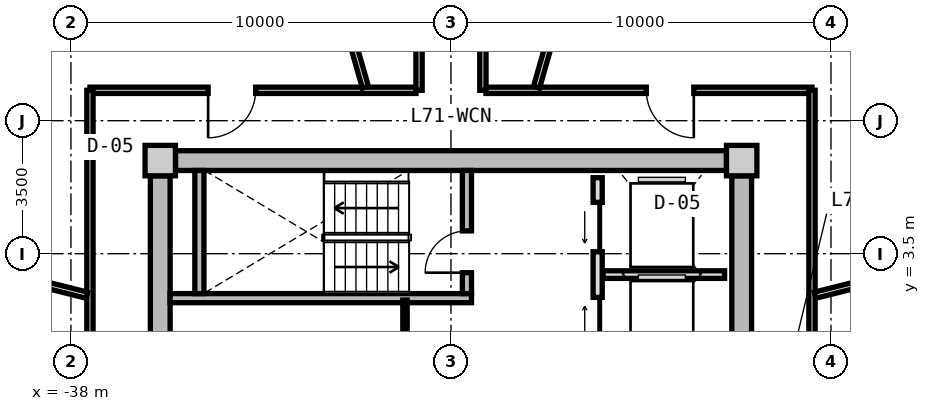
"""IFC4 building model, lengths in metres.
Left out: names, types, materials, properties, quantities, classifications, styles, units other than length and angle.
Written with IfcOpenShell. Run it as: python <this file> out.ifc"""

import sys

from ifc_helpers import new_model, si_unit, direction, frame, frame_2d, origin, origin_2d, place, context, subcontext, project, spatial, rectangle, extrude, source, transform, mapped, element, fill, save


model = new_model("IFC4")
c1 = context("Model", 3, precision=1e-05, world=origin(), true_north=direction((0.0, 1.0)))
c2 = subcontext(c1, "Body", "Model", "MODEL_VIEW")
j1 = project(units=[si_unit("LENGTHUNIT", "METRE"), si_unit("PLANEANGLEUNIT", "RADIAN")], contexts=[c1])
p1 = place(None, origin())
s1 = spatial("IfcSite", under=j1, at=p1, CompositionType="ELEMENT")
p2 = place(p1, origin())
s2 = spatial("IfcBuilding", under=s1, at=p2, CompositionType="ELEMENT")
p3 = place(p2, frame((0.0, 0.0, 229.15)))
s3 = spatial("IfcBuildingStorey", under=s2, at=p3, CompositionType="ELEMENT", Elevation=229.15)
m1 = source(origin(), c2, "Body", "SweptSolid", [
    extrude(rectangle(XDim=0.8, YDim=0.8, at=origin_2d()), origin(), (0.0, 0.0, 1.0), 3.05),
])
for number, where, z_axis, x_axis in (
    (1, (-20.35, 5.95, 0.0), (0.0, 0.0, 1.0), (1.0, 0.0, 0.0)),
    (2, (-35.65, 5.95, 0.0), (0.0, 0.0, 1.0), (1.0, 0.0, 0.0)),
):
    element("IfcColumn", number, at=place(p3, frame(where, z_axis=z_axis, x_axis=x_axis)), inside=s3, PredefinedType="COLUMN", context=c2, shape_type="MappedRepresentation", body=[
        mapped(m1, transform((0.0, 0.0, 0.0), x_axis=(1.0, 0.0, 0.0), y_axis=(0.0, 1.0, 0.0), z_axis=(0.0, 0.0, 1.0), scale=1.0)),
    ])
m2 = source(origin(), c2, "Body", "SweptSolid", [
    extrude(rectangle(XDim=14.5, YDim=0.52, at=frame_2d((7.25, 0.0))), origin(), (0.0, 0.0, 1.0), 2.81),
])
p4 = place(p3, frame((-35.25, 5.95, 0.0), z_axis=(0.0, 0.0, 1.0), x_axis=(1.0, 0.0, 0.0)))
e3 = element("IfcWall", 3, at=p4, inside=s3, PredefinedType="SHEAR", context=c2, shape_type="MappedRepresentation", body=[
    mapped(m2, transform((0.0, 0.0, 0.0), x_axis=(1.0, 0.0, 0.0), y_axis=(0.0, 1.0, 0.0), z_axis=(0.0, 0.0, 1.0), scale=1.0)),
])
m3 = source(origin(), c2, "Body", "SweptSolid", [
    extrude(rectangle(XDim=11.1, YDim=0.52, at=frame_2d((5.55, 0.0))), origin(), (0.0, 0.0, 1.0), 2.81),
])
p5 = place(p3, frame((-35.65, -5.55, 0.0), z_axis=(0.0, 0.0, 1.0), x_axis=(0.0, 1.0, 0.0)))
e4 = element("IfcWall", 4, at=p5, inside=s3, PredefinedType="SHEAR", context=c2, shape_type="MappedRepresentation", body=[
    mapped(m3, transform((0.0, 0.0, 0.0), x_axis=(1.0, 0.0, 0.0), y_axis=(0.0, 1.0, 0.0), z_axis=(0.0, 0.0, 1.0), scale=1.0)),
])
p6 = place(p5, frame((3.8, 0.0, 0.0)))
e5 = element("IfcOpeningElement", 5, at=p6, cuts=e4, PredefinedType="OPENING", context=c2, shape_type="SweptSolid", body=[
    extrude(rectangle(XDim=1.2, YDim=2.15, at=frame_2d((0.6, 1.075))), frame((0.0, 0.27, 0.0), z_axis=(0.0, -1.0, 0.0), x_axis=(1.0, 0.0, 0.0)), (0.0, 0.0, 1.0), 0.54),
])
p7 = place(p3, frame((-20.35, 5.55, 0.0), z_axis=(0.0, 0.0, 1.0), x_axis=(0.0, -1.0, 0.0)))
e6 = element("IfcWall", 6, at=p7, inside=s3, PredefinedType="SHEAR", context=c2, shape_type="MappedRepresentation", body=[
    mapped(m3, transform((0.0, 0.0, 0.0), x_axis=(1.0, 0.0, 0.0), y_axis=(0.0, 1.0, 0.0), z_axis=(0.0, 0.0, 1.0), scale=1.0)),
])
p8 = place(p7, frame((5.65, 0.0, 0.0)))
e7 = element("IfcOpeningElement", 7, at=p8, cuts=e6, PredefinedType="OPENING", context=c2, shape_type="SweptSolid", body=[
    extrude(rectangle(XDim=1.2, YDim=2.15, at=frame_2d((0.6, 1.075))), frame((0.0, 0.27, 0.0), z_axis=(0.0, -1.0, 0.0), x_axis=(1.0, 0.0, 0.0)), (0.0, 0.0, 1.0), 0.54),
])
p9 = place(p7, frame((9.3, 0.0, 0.0)))
e8 = element("IfcOpeningElement", 8, at=p9, cuts=e6, PredefinedType="OPENING", context=c2, shape_type="SweptSolid", body=[
    extrude(rectangle(XDim=1.0, YDim=2.1, at=frame_2d((0.5, 1.05))), frame((0.0, 0.27, 0.0), z_axis=(0.0, -1.0, 0.0), x_axis=(1.0, 0.0, 0.0)), (0.0, 0.0, 1.0), 0.54),
])
m4 = source(origin(), c2, "Body", "SweptSolid", [
    extrude(rectangle(XDim=7.93, YDim=0.24, at=frame_2d((3.965, 0.0))), origin(), (0.0, 0.0, 1.0), 2.81),
])
p10 = place(p3, frame((-35.39, 2.33, 0.0), z_axis=(0.0, 0.0, 1.0), x_axis=(1.0, 0.0, 0.0)))
e9 = element("IfcWall", 9, at=p10, inside=s3, PredefinedType="PARTITIONING", context=c2, shape_type="MappedRepresentation", body=[
    mapped(m4, transform((0.0, 0.0, 0.0), x_axis=(1.0, 0.0, 0.0), y_axis=(0.0, 1.0, 0.0), z_axis=(0.0, 0.0, 1.0), scale=1.0)),
])
m5 = source(origin(), c2, "Body", "SweptSolid", [
    extrude(rectangle(XDim=3.24, YDim=0.24, at=frame_2d((1.62, 0.0))), origin(), (0.0, 0.0, 1.0), 2.81),
])
p11 = place(p3, frame((-34.62, 2.45, 0.0), z_axis=(0.0, 0.0, 1.0), x_axis=(0.0, 1.0, 0.0)))
e10 = element("IfcWall", 10, at=p11, inside=s3, PredefinedType="PARTITIONING", context=c2, shape_type="MappedRepresentation", body=[
    mapped(m5, transform((0.0, 0.0, 0.0), x_axis=(1.0, 0.0, 0.0), y_axis=(0.0, 1.0, 0.0), z_axis=(0.0, 0.0, 1.0), scale=1.0)),
])
p12 = place(p3, frame((-27.58, 2.45, 0.0), z_axis=(0.0, 0.0, 1.0), x_axis=(0.0, 1.0, 0.0)))
e11 = element("IfcWall", 11, at=p12, inside=s3, PredefinedType="PARTITIONING", context=c2, shape_type="MappedRepresentation", body=[
    mapped(m5, transform((0.0, 0.0, 0.0), x_axis=(1.0, 0.0, 0.0), y_axis=(0.0, 1.0, 0.0), z_axis=(0.0, 0.0, 1.0), scale=1.0)),
])
p13 = place(p12, frame((0.55, 0.0, 0.0)))
e12 = element("IfcOpeningElement", 12, at=p13, cuts=e11, PredefinedType="OPENING", context=c2, shape_type="SweptSolid", body=[
    extrude(rectangle(XDim=1.1, YDim=2.15, at=frame_2d((0.55, 1.075))), frame((0.0, 0.13, 0.0), z_axis=(0.0, -1.0, 0.0), x_axis=(1.0, 0.0, 0.0)), (0.0, 0.0, 1.0), 0.26),
])
m6 = source(origin(), c2, "Body", "SweptSolid", [
    extrude(rectangle(XDim=5.0, YDim=0.24, at=frame_2d((2.5, 0.0))), origin(), (0.0, 0.0, 1.0), 2.795),
])
p14 = place(p3, frame((-24.14, 0.5, 0.0), z_axis=(0.0, 0.0, 1.0), x_axis=(0.0, 1.0, 0.0)))
e13 = element("IfcWall", 13, at=p14, inside=s3, PredefinedType="PARTITIONING", context=c2, shape_type="MappedRepresentation", body=[
    mapped(m6, transform((0.0, 0.0, 0.0), x_axis=(1.0, 0.0, 0.0), y_axis=(0.0, 1.0, 0.0), z_axis=(0.0, 0.0, 1.0), scale=1.0)),
])
p15 = place(p14, frame((3.05, 0.0, 0.0)))
e14 = element("IfcOpeningElement", 14, at=p15, cuts=e13, PredefinedType="OPENING", context=c2, shape_type="SweptSolid", body=[
    extrude(rectangle(XDim=1.3, YDim=2.2, at=frame_2d((0.65, 1.1))), frame((0.0, 0.13, 0.0), z_axis=(0.0, -1.0, 0.0), x_axis=(1.0, 0.0, 0.0)), (0.0, 0.0, 1.0), 0.26),
])
p16 = place(p14, frame((0.55, 0.0, 0.0)))
e15 = element("IfcOpeningElement", 15, at=p16, cuts=e13, PredefinedType="OPENING", context=c2, shape_type="SweptSolid", body=[
    extrude(rectangle(XDim=1.3, YDim=2.2, at=frame_2d((0.65, 1.1))), frame((0.0, 0.13, 0.0), z_axis=(0.0, -1.0, 0.0), x_axis=(1.0, 0.0, 0.0)), (0.0, 0.0, 1.0), 0.26),
])
m7 = source(origin(), c2, "Body", "SweptSolid", [
    extrude(rectangle(XDim=3.2, YDim=0.2, at=frame_2d((1.6, 0.0))), origin(), (0.0, 0.0, 1.0), 2.795),
])
p17 = place(p3, frame((-24.0, 2.95, 0.0), z_axis=(0.0, 0.0, 1.0), x_axis=(1.0, 0.0, 0.0)))
e16 = element("IfcWall", 16, at=p17, inside=s3, PredefinedType="PARTITIONING", context=c2, shape_type="MappedRepresentation", body=[
    mapped(m7, transform((0.0, 0.0, 0.0), x_axis=(1.0, 0.0, 0.0), y_axis=(0.0, 1.0, 0.0), z_axis=(0.0, 0.0, 1.0), scale=1.0)),
])
m8 = source(origin(), c2, "Body", "SweptSolid", [
    extrude(rectangle(XDim=2.33, YDim=0.115, at=frame_2d((1.165, 0.0))), origin(), (0.0, 0.0, 1.0), 2.795),
])
p18 = place(p3, frame((-29.21, -0.05, 0.0), z_axis=(0.0, 0.0, 1.0), x_axis=(0.0, 1.0, 0.0)))
e17 = element("IfcWall", 17, at=p18, inside=s3, PredefinedType="PARTITIONING", context=c2, shape_type="MappedRepresentation", body=[
    mapped(m8, transform((0.0, 0.0, 0.0), x_axis=(1.0, 0.0, 0.0), y_axis=(0.0, 1.0, 0.0), z_axis=(0.0, 0.0, 1.0), scale=1.0)),
])
m9 = source(origin(), c2, "Body", "SweptSolid", [
    extrude(rectangle(XDim=8.58, YDim=0.165, at=frame_2d((4.29, 0.0))), origin(), (0.0, 0.0, 1.0), 2.795),
])
p19 = place(p3, frame((-37.5, 7.8, 0.0), z_axis=(0.0, 0.0, 1.0), x_axis=(1.0, 0.0, 0.0)))
e18 = element("IfcWall", 18, at=p19, inside=s3, PredefinedType="PARTITIONING", context=c2, shape_type="MappedRepresentation", body=[
    mapped(m9, transform((0.0, 0.0, 0.0), x_axis=(1.0, 0.0, 0.0), y_axis=(0.0, 1.0, 0.0), z_axis=(0.0, 0.0, 1.0), scale=1.0)),
])
p20 = place(p19, frame((3.11, 0.0, 0.0)))
e19 = element("IfcOpeningElement", 19, at=p20, cuts=e18, PredefinedType="OPENING", context=c2, shape_type="SweptSolid", body=[
    extrude(rectangle(XDim=1.25, YDim=2.2, at=frame_2d((0.625, 1.1))), frame((0.0, 0.093, 0.0), z_axis=(0.0, -1.0, 0.0), x_axis=(1.0, 0.0, 0.0)), (0.0, 0.0, 1.0), 0.185),
])
p21 = place(p3, frame((-27.08, 7.8, 0.0), z_axis=(0.0, 0.0, 1.0), x_axis=(1.0, 0.0, 0.0)))
e20 = element("IfcWall", 20, at=p21, inside=s3, PredefinedType="PARTITIONING", context=c2, shape_type="MappedRepresentation", body=[
    mapped(m9, transform((0.0, 0.0, 0.0), x_axis=(1.0, 0.0, 0.0), y_axis=(0.0, 1.0, 0.0), z_axis=(0.0, 0.0, 1.0), scale=1.0)),
])
p22 = place(p21, frame((4.22, 0.0, 0.0)))
e21 = element("IfcOpeningElement", 21, at=p22, cuts=e20, PredefinedType="OPENING", context=c2, shape_type="SweptSolid", body=[
    extrude(rectangle(XDim=1.25, YDim=2.2, at=frame_2d((0.625, 1.1))), frame((0.0, 0.093, 0.0), z_axis=(0.0, -1.0, 0.0), x_axis=(1.0, 0.0, 0.0)), (0.0, 0.0, 1.0), 0.185),
])
m10 = source(origin(), c2, "Body", "SweptSolid", [
    extrude(rectangle(XDim=6.88, YDim=0.165, at=frame_2d((3.44, 0.0))), origin(), (0.0, 0.0, 1.0), 2.795),
])
for number, where, z_axis, x_axis in (
    (22, (-37.5, 0.92, 0.0), (0.0, 0.0, 1.0), (0.0, 1.0, 0.0)),
    (23, (-18.5, 7.8, 0.0), (0.0, 0.0, 1.0), (0.0, -1.0, 0.0)),
):
    element("IfcWall", number, at=place(p3, frame(where, z_axis=z_axis, x_axis=x_axis)), inside=s3, PredefinedType="PARTITIONING", context=c2, shape_type="MappedRepresentation", body=[
        mapped(m10, transform((0.0, 0.0, 0.0), x_axis=(1.0, 0.0, 0.0), y_axis=(0.0, 1.0, 0.0), z_axis=(0.0, 0.0, 1.0), scale=1.0)),
    ])
m11 = source(origin(), c2, "Body", "SweptSolid", [
    extrude(rectangle(XDim=6.974, YDim=0.165, at=frame_2d((3.487, 0.0))), origin(), (0.0, 0.0, 1.0), 2.395),
])
for number, where, z_axis, x_axis in (
    (24, (-25.749, 7.88, 0.0), (0.0, 0.0, 1.0), (0.275, 0.962, 0.0)),
    (25, (-30.251, 7.88, 0.0), (0.0, 0.0, 1.0), (-0.275, 0.962, 0.0)),
):
    element("IfcWall", number, at=place(p3, frame(where, z_axis=z_axis, x_axis=x_axis)), inside=s3, PredefinedType="PARTITIONING", context=c2, shape_type="MappedRepresentation", body=[
        mapped(m11, transform((0.0, 0.0, 0.0), x_axis=(1.0, 0.0, 0.0), y_axis=(0.0, 1.0, 0.0), z_axis=(0.0, 0.0, 1.0), scale=1.0)),
    ])
m12 = source(origin(), c2, "Body", "SweptSolid", [
    extrude(rectangle(XDim=6.157, YDim=0.165, at=frame_2d((3.079, 0.0))), origin(), (0.0, 0.0, 1.0), 2.395),
])
for number, where, z_axis, x_axis in (
    (26, (-37.58, 2.407, 0.0), (0.0, 0.0, 1.0), (-0.97, 0.244, 0.0)),
    (27, (-18.42, 2.407, 0.0), (0.0, 0.0, 1.0), (0.97, 0.244, 0.0)),
):
    element("IfcWall", number, at=place(p3, frame(where, z_axis=z_axis, x_axis=x_axis)), inside=s3, PredefinedType="PARTITIONING", context=c2, shape_type="MappedRepresentation", body=[
        mapped(m12, transform((0.0, 0.0, 0.0), x_axis=(1.0, 0.0, 0.0), y_axis=(0.0, 1.0, 0.0), z_axis=(0.0, 0.0, 1.0), scale=1.0)),
    ])
m13 = source(origin(), c2, "Body", "SweptSolid", [
    extrude(rectangle(XDim=6.835, YDim=0.165, at=frame_2d((3.418, 0.0))), origin(), (0.0, 0.0, 1.0), 2.795),
])
p23 = place(p3, frame((-28.84, 7.8, 0.0), z_axis=(0.0, 0.0, 1.0), x_axis=(0.0, 1.0, 0.0)))
e28 = element("IfcWall", 28, at=p23, inside=s3, PredefinedType="PARTITIONING", context=c2, shape_type="MappedRepresentation", body=[
    mapped(m13, transform((0.0, 0.0, 0.0), x_axis=(1.0, 0.0, 0.0), y_axis=(0.0, 1.0, 0.0), z_axis=(0.0, 0.0, 1.0), scale=1.0)),
])
p24 = place(p23, frame((2.943, 0.0, 0.0)))
e29 = element("IfcOpeningElement", 29, at=p24, cuts=e28, PredefinedType="OPENING", context=c2, shape_type="SweptSolid", body=[
    extrude(rectangle(XDim=0.95, YDim=2.1, at=frame_2d((0.475, 1.05))), frame((0.0, 0.093, 0.0), z_axis=(0.0, -1.0, 0.0), x_axis=(1.0, 0.0, 0.0)), (0.0, 0.0, 1.0), 0.185),
])
p25 = place(p3, frame((-27.16, 14.635, 0.0), z_axis=(0.0, 0.0, 1.0), x_axis=(0.0, -1.0, 0.0)))
e30 = element("IfcWall", 30, at=p25, inside=s3, PredefinedType="PARTITIONING", context=c2, shape_type="MappedRepresentation", body=[
    mapped(m13, transform((0.0, 0.0, 0.0), x_axis=(1.0, 0.0, 0.0), y_axis=(0.0, 1.0, 0.0), z_axis=(0.0, 0.0, 1.0), scale=1.0)),
])
p26 = place(p25, frame((2.943, 0.0, 0.0)))
e31 = element("IfcOpeningElement", 31, at=p26, cuts=e30, PredefinedType="OPENING", context=c2, shape_type="SweptSolid", body=[
    extrude(rectangle(XDim=0.95, YDim=2.1, at=frame_2d((0.475, 1.05))), frame((0.0, 0.093, 0.0), z_axis=(0.0, -1.0, 0.0), x_axis=(1.0, 0.0, 0.0)), (0.0, 0.0, 1.0), 0.185),
])
m14 = source(origin(), c2, "Body", "SweptSolid", [
    extrude(rectangle(XDim=1.1, YDim=2.15, at=frame_2d((0.55, 1.075))), frame((0.0, 0.025, 0.0), z_axis=(0.0, -1.0, 0.0), x_axis=(1.0, 0.0, 0.0)), (0.0, 0.0, 1.0), 0.05),
])
p27 = place(p13, origin())
e32 = element("IfcDoor", 32, at=p27, inside=s3, OperationType="SINGLE_SWING_LEFT", PredefinedType="DOOR", context=c2, shape_type="MappedRepresentation", body=[
    mapped(m14, transform((0.0, 0.0, 0.0), x_axis=(1.0, 0.0, 0.0), y_axis=(0.0, 1.0, 0.0), z_axis=(0.0, 0.0, 1.0), scale=1.0)),
])
fill(e12, e32)
m15 = source(origin(), c2, "Body", "SweptSolid", [
    extrude(rectangle(XDim=1.3, YDim=2.2, at=frame_2d((0.65, 1.1))), frame((0.0, 0.025, 0.0), z_axis=(0.0, -1.0, 0.0), x_axis=(1.0, 0.0, 0.0)), (0.0, 0.0, 1.0), 0.05),
])
p28 = place(p15, origin())
e33 = element("IfcDoor", 33, at=p28, inside=s3, OperationType="SLIDING_TO_LEFT", PredefinedType="DOOR", context=c2, shape_type="MappedRepresentation", body=[
    mapped(m15, transform((0.0, 0.0, 0.0), x_axis=(1.0, 0.0, 0.0), y_axis=(0.0, 1.0, 0.0), z_axis=(0.0, 0.0, 1.0), scale=1.0)),
])
fill(e14, e33)
p29 = place(p16, origin())
e34 = element("IfcDoor", 34, at=p29, inside=s3, OperationType="SLIDING_TO_RIGHT", PredefinedType="DOOR", context=c2, shape_type="MappedRepresentation", body=[
    mapped(m15, transform((0.0, 0.0, 0.0), x_axis=(1.0, 0.0, 0.0), y_axis=(0.0, 1.0, 0.0), z_axis=(0.0, 0.0, 1.0), scale=1.0)),
])
fill(e15, e34)
m16 = source(origin(), c2, "Body", "SweptSolid", [
    extrude(rectangle(XDim=1.25, YDim=2.2, at=frame_2d((0.625, 1.1))), frame((0.0, 0.025, 0.0), z_axis=(0.0, -1.0, 0.0), x_axis=(1.0, 0.0, 0.0)), (0.0, 0.0, 1.0), 0.05),
])
p30 = place(p22, frame((1.25, 0.0, 0.0), z_axis=(0.0, 0.0, 1.0), x_axis=(-1.0, 0.0, 0.0)))
e35 = element("IfcDoor", 35, at=p30, inside=s3, OperationType="SINGLE_SWING_LEFT", PredefinedType="DOOR", context=c2, shape_type="MappedRepresentation", body=[
    mapped(m16, transform((0.0, 0.0, 0.0), x_axis=(1.0, 0.0, 0.0), y_axis=(0.0, 1.0, 0.0), z_axis=(0.0, 0.0, 1.0), scale=1.0)),
])
fill(e21, e35)
p31 = place(p20, frame((1.25, 0.0, 0.0), z_axis=(0.0, 0.0, 1.0), x_axis=(-1.0, 0.0, 0.0)))
e36 = element("IfcDoor", 36, at=p31, inside=s3, OperationType="SINGLE_SWING_RIGHT", PredefinedType="DOOR", context=c2, shape_type="MappedRepresentation", body=[
    mapped(m16, transform((0.0, 0.0, 0.0), x_axis=(1.0, 0.0, 0.0), y_axis=(0.0, 1.0, 0.0), z_axis=(0.0, 0.0, 1.0), scale=1.0)),
])
fill(e19, e36)
save(model, sys.argv[1])
